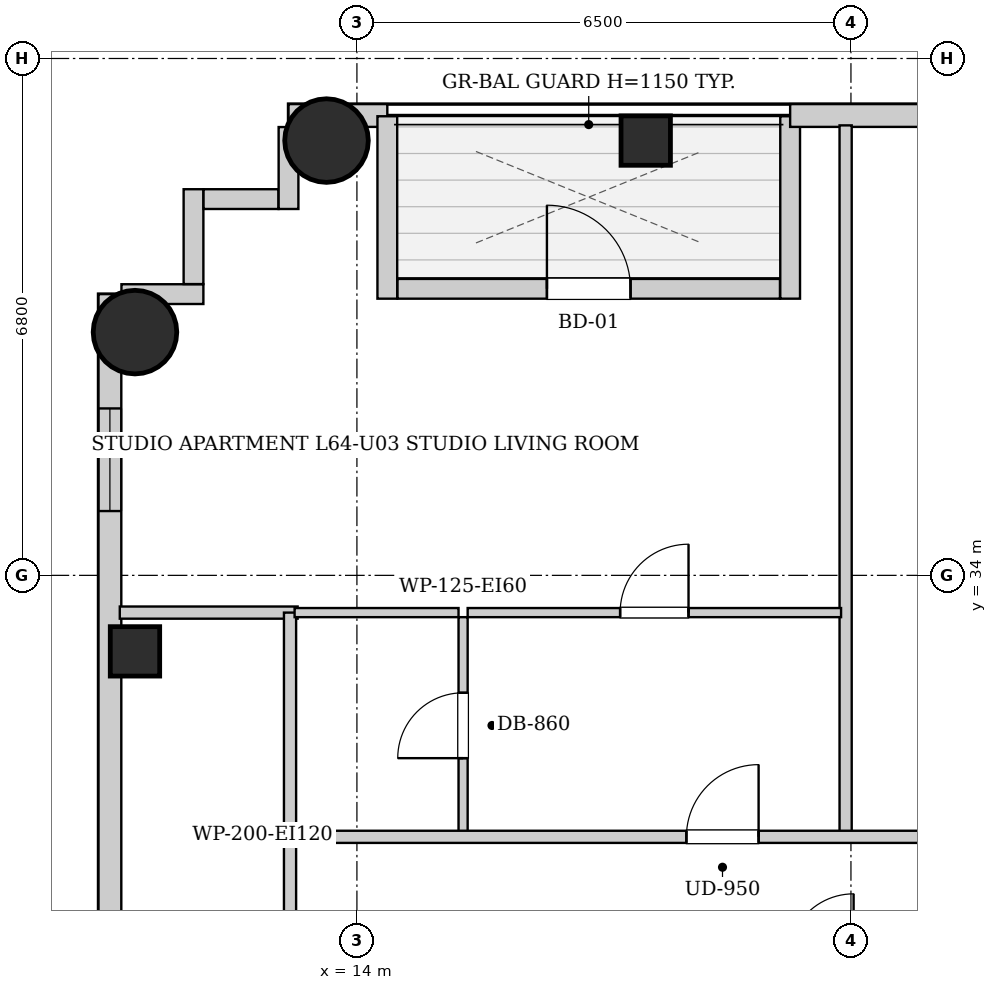
"""IFC4 building model, lengths in metres.
Left out: names, types, materials, properties, quantities, classifications, styles, units other than length and angle.
Written with IfcOpenShell. Run it as: python <this file> out.ifc"""

import sys

from ifc_helpers import new_model, si_unit, direction, frame, frame_2d, origin, origin_2d, place, context, subcontext, project, spatial, rectangle, circle, extrude, element, fill, save


model = new_model("IFC4")
c1 = context("Model", 3, precision=1e-05, world=origin(), true_north=direction((0.0, 1.0)))
c2 = subcontext(c1, "Body", "Model", "MODEL_VIEW")
j1 = project(units=[si_unit("LENGTHUNIT", "METRE"), si_unit("PLANEANGLEUNIT", "RADIAN")], contexts=[c1])
p1 = place(None, origin())
s1 = spatial("IfcSite", under=j1, at=p1, CompositionType="ELEMENT")
p2 = place(p1, origin())
s2 = spatial("IfcBuilding", under=s1, at=p2, CompositionType="ELEMENT")
p3 = place(p2, frame((0.0, 0.0, 220.7)))
s3 = spatial("IfcBuildingStorey", under=s2, at=p3, CompositionType="ELEMENT", Elevation=220.7)
p4 = place(p3, frame((13.6, 39.72, 0.0), z_axis=(0.0, 0.0, 1.0), x_axis=(1.0, 0.0, 0.0)))
e1 = element("IfcColumn", 1, at=p4, inside=s3, PredefinedType="COLUMN", context=c2, shape_type="SweptSolid", body=[
    extrude(circle(Radius=0.55, at=origin_2d()), origin(), (0.0, 0.0, 1.0), 3.4),
])
for number, where, z_axis, x_axis in (
    (2, (17.8, 39.72, 0.0), (0.0, 0.0, 1.0), (1.0, 0.0, 0.0)),
    (3, (11.08, 33.0, 0.0), (0.0, 0.0, 1.0), (1.0, 0.0, 0.0)),
):
    element("IfcColumn", number, at=place(p3, frame(where, z_axis=z_axis, x_axis=x_axis)), inside=s3, PredefinedType="COLUMN", context=c2, shape_type="SweptSolid", body=[
        extrude(rectangle(XDim=0.65, YDim=0.65, at=origin_2d()), origin(), (0.0, 0.0, 1.0), 3.4),
    ])
p5 = place(p3, frame((11.08, 37.2, 0.0), z_axis=(0.0, 0.0, 1.0), x_axis=(1.0, 0.0, 0.0)))
e4 = element("IfcColumn", 4, at=p5, inside=s3, PredefinedType="COLUMN", context=c2, shape_type="SweptSolid", body=[
    extrude(circle(Radius=0.55, at=origin_2d()), origin(), (0.0, 0.0, 1.0), 3.4),
])
p6 = place(p3, frame((13.1, 40.05, 0.0), z_axis=(0.0, 0.0, 1.0), x_axis=(1.0, 0.0, 0.0)))
e5 = element("IfcWall", 5, at=p6, inside=s3, PredefinedType="SOLIDWALL", context=c2, shape_type="SweptSolid", body=[
    extrude(rectangle(XDim=1.3, YDim=0.3, at=frame_2d((0.65, 0.0))), origin(), (0.0, 0.0, 1.0), 3.14),
])
p7 = place(p3, frame((14.4, 40.04, 0.0), z_axis=(0.0, 0.0, 1.0), x_axis=(0.0, -1.0, 0.0)))
e6 = element("IfcWall", 6, at=p7, inside=s3, PredefinedType="SOLIDWALL", context=c2, shape_type="SweptSolid", body=[
    extrude(rectangle(XDim=2.4, YDim=0.26, at=frame_2d((1.2, 0.0))), origin(), (0.0, 0.0, 1.0), 3.14),
])
p8 = place(p3, frame((14.534, 37.77, 0.0), z_axis=(0.0, 0.0, 1.0), x_axis=(1.0, 0.0, 0.0)))
e7 = element("IfcWall", 7, at=p8, inside=s3, PredefinedType="SOLIDWALL", context=c2, shape_type="SweptSolid", body=[
    extrude(rectangle(XDim=5.032, YDim=0.26, at=frame_2d((2.516, 0.0))), origin(), (0.0, 0.0, 1.0), 3.14),
])
p9 = place(p8, frame((1.966, 0.0, 0.0)))
e8 = element("IfcOpeningElement", 8, at=p9, cuts=e7, PredefinedType="OPENING", context=c2, shape_type="SweptSolid", body=[
    extrude(rectangle(XDim=1.1, YDim=2.0, at=frame_2d((0.55, 1.0))), frame((0.0, 0.14, 0.0), z_axis=(0.0, -1.0, 0.0), x_axis=(1.0, 0.0, 0.0)), (0.0, 0.0, 1.0), 0.28),
])
p10 = place(p3, frame((19.7, 37.64, 0.0), z_axis=(0.0, 0.0, 1.0), x_axis=(0.0, 1.0, 0.0)))
e9 = element("IfcWall", 9, at=p10, inside=s3, PredefinedType="SOLIDWALL", context=c2, shape_type="SweptSolid", body=[
    extrude(rectangle(XDim=2.4, YDim=0.26, at=frame_2d((1.2, 0.0))), origin(), (0.0, 0.0, 1.0), 3.14),
])
p11 = place(p3, frame((19.7, 40.05, 0.0), z_axis=(0.0, 0.0, 1.0), x_axis=(1.0, 0.0, 0.0)))
e10 = element("IfcWall", 10, at=p11, inside=s3, PredefinedType="SOLIDWALL", context=c2, shape_type="SweptSolid", body=[
    extrude(rectangle(XDim=9.15, YDim=0.3, at=frame_2d((4.575, 0.0))), origin(), (0.0, 0.0, 1.0), 3.14),
])
p12 = place(p11, frame((7.8, 0.0, 0.55)))
e11 = element("IfcOpeningElement", 11, at=p12, cuts=e10, PredefinedType="OPENING", context=c2, shape_type="SweptSolid", body=[
    extrude(rectangle(XDim=0.85, YDim=1.2, at=frame_2d((0.425, 0.6))), frame((0.0, 0.16, 0.0), z_axis=(0.0, -1.0, 0.0), x_axis=(1.0, 0.0, 0.0)), (0.0, 0.0, 1.0), 0.32),
])
p13 = place(p3, frame((10.75, 6.3, 0.0), z_axis=(0.0, 0.0, 1.0), x_axis=(0.0, 1.0, 0.0)))
e12 = element("IfcWall", 12, at=p13, inside=s3, PredefinedType="SOLIDWALL", context=c2, shape_type="SweptSolid", body=[
    extrude(rectangle(XDim=31.4, YDim=0.3, at=frame_2d((15.7, 0.0))), origin(), (0.0, 0.0, 1.0), 3.14),
])
p14 = place(p13, frame((1.504, 0.0, 0.55)))
e13 = element("IfcOpeningElement", 13, at=p14, cuts=e12, PredefinedType="OPENING", context=c2, shape_type="SweptSolid", body=[
    extrude(rectangle(XDim=1.35, YDim=1.2, at=frame_2d((0.675, 0.6))), frame((0.0, 0.16, 0.0), z_axis=(0.0, -1.0, 0.0), x_axis=(1.0, 0.0, 0.0)), (0.0, 0.0, 1.0), 0.32),
])
p15 = place(p13, frame((28.546, 0.0, 0.55)))
e14 = element("IfcOpeningElement", 14, at=p15, cuts=e12, PredefinedType="OPENING", context=c2, shape_type="SweptSolid", body=[
    extrude(rectangle(XDim=1.35, YDim=1.2, at=frame_2d((0.675, 0.6))), frame((0.0, 0.16, 0.0), z_axis=(0.0, -1.0, 0.0), x_axis=(1.0, 0.0, 0.0)), (0.0, 0.0, 1.0), 0.32),
])
p16 = place(p13, frame((10.367, 0.0, 0.55)))
e15 = element("IfcOpeningElement", 15, at=p16, cuts=e12, PredefinedType="OPENING", context=c2, shape_type="SweptSolid", body=[
    extrude(rectangle(XDim=1.35, YDim=1.2, at=frame_2d((0.675, 0.6))), frame((0.0, 0.16, 0.0), z_axis=(0.0, -1.0, 0.0), x_axis=(1.0, 0.0, 0.0)), (0.0, 0.0, 1.0), 0.32),
])
p17 = place(p13, frame((19.683, 0.0, 0.55)))
e16 = element("IfcOpeningElement", 16, at=p17, cuts=e12, PredefinedType="OPENING", context=c2, shape_type="SweptSolid", body=[
    extrude(rectangle(XDim=1.35, YDim=1.2, at=frame_2d((0.675, 0.6))), frame((0.0, 0.16, 0.0), z_axis=(0.0, -1.0, 0.0), x_axis=(1.0, 0.0, 0.0)), (0.0, 0.0, 1.0), 0.32),
])
p18 = place(p3, frame((10.902, 37.7, 0.0), z_axis=(0.0, 0.0, 1.0), x_axis=(1.0, 0.0, 0.0)))
e17 = element("IfcWall", 17, at=p18, inside=s3, PredefinedType="SOLIDWALL", context=c2, shape_type="SweptSolid", body=[
    extrude(rectangle(XDim=1.078, YDim=0.26, at=frame_2d((0.539, 0.0))), origin(), (0.0, 0.0, 1.0), 3.14),
])
p19 = place(p3, frame((11.85, 37.832, 0.0), z_axis=(0.0, 0.0, 1.0), x_axis=(0.0, 1.0, 0.0)))
e18 = element("IfcWall", 18, at=p19, inside=s3, PredefinedType="SOLIDWALL", context=c2, shape_type="SweptSolid", body=[
    extrude(rectangle(XDim=1.248, YDim=0.26, at=frame_2d((0.624, 0.0))), origin(), (0.0, 0.0, 1.0), 3.14),
])
p20 = place(p3, frame((11.982, 38.95, 0.0), z_axis=(0.0, 0.0, 1.0), x_axis=(1.0, 0.0, 0.0)))
e19 = element("IfcWall", 19, at=p20, inside=s3, PredefinedType="SOLIDWALL", context=c2, shape_type="SweptSolid", body=[
    extrude(rectangle(XDim=0.986, YDim=0.26, at=frame_2d((0.493, 0.0))), origin(), (0.0, 0.0, 1.0), 3.14),
])
p21 = place(p3, frame((13.1, 38.82, 0.0), z_axis=(0.0, 0.0, 1.0), x_axis=(0.0, 1.0, 0.0)))
e20 = element("IfcWall", 20, at=p21, inside=s3, PredefinedType="SOLIDWALL", context=c2, shape_type="SweptSolid", body=[
    extrude(rectangle(XDim=1.078, YDim=0.26, at=frame_2d((0.539, 0.0))), origin(), (0.0, 0.0, 1.0), 3.14),
])
p22 = place(p3, frame((13.12, 28.98, 0.0), z_axis=(0.0, 0.0, 1.0), x_axis=(0.0, 1.0, 0.0)))
e21 = element("IfcWall", 21, at=p22, inside=s3, PredefinedType="PARTITIONING", context=c2, shape_type="SweptSolid", body=[
    extrude(rectangle(XDim=1.58, YDim=0.16, at=frame_2d((0.79, 0.0))), origin(), (0.0, 0.0, 1.0), 3.14),
])
p23 = place(p3, frame((10.88, 33.51, 0.0), z_axis=(0.0, 0.0, 1.0), x_axis=(1.0, 0.0, 0.0)))
e22 = element("IfcWall", 22, at=p23, inside=s3, PredefinedType="PARTITIONING", context=c2, shape_type="SweptSolid", body=[
    extrude(rectangle(XDim=2.34, YDim=0.16, at=frame_2d((1.17, 0.0))), origin(), (0.0, 0.0, 1.0), 3.14),
])
p24 = place(p3, frame((13.12, 30.6, 0.0), z_axis=(0.0, 0.0, 1.0), x_axis=(0.0, 1.0, 0.0)))
e23 = element("IfcWall", 23, at=p24, inside=s3, PredefinedType="PARTITIONING", context=c2, shape_type="SweptSolid", body=[
    extrude(rectangle(XDim=2.91, YDim=0.16, at=frame_2d((1.455, 0.0))), origin(), (0.0, 0.0, 1.0), 3.14),
])
p25 = place(p3, frame((20.43, 30.6, 0.0), z_axis=(0.0, 0.0, 1.0), x_axis=(0.0, 1.0, 0.0)))
e24 = element("IfcWall", 24, at=p25, inside=s3, PredefinedType="PARTITIONING", context=c2, shape_type="SweptSolid", body=[
    extrude(rectangle(XDim=9.32, YDim=0.16, at=frame_2d((4.66, 0.0))), origin(), (0.0, 0.0, 1.0), 3.14),
])
p26 = place(p3, frame((15.397, 30.6, 0.0), z_axis=(0.0, 0.0, 1.0), x_axis=(0.0, 1.0, 0.0)))
e25 = element("IfcWall", 25, at=p26, inside=s3, PredefinedType="PARTITIONING", context=c2, shape_type="SweptSolid", body=[
    extrude(rectangle(XDim=2.85, YDim=0.12, at=frame_2d((1.425, 0.0))), origin(), (0.0, 0.0, 1.0), 3.14),
])
p27 = place(p26, frame((0.995, 0.0, 0.0)))
e26 = element("IfcOpeningElement", 26, at=p27, cuts=e25, PredefinedType="OPENING", context=c2, shape_type="SweptSolid", body=[
    extrude(rectangle(XDim=0.86, YDim=2.05, at=frame_2d((0.43, 1.025))), frame((0.0, 0.07, 0.0), z_axis=(0.0, -1.0, 0.0), x_axis=(1.0, 0.0, 0.0)), (0.0, 0.0, 1.0), 0.14),
])
p28 = place(p3, frame((13.18, 33.51, 0.0), z_axis=(0.0, 0.0, 1.0), x_axis=(1.0, 0.0, 0.0)))
e27 = element("IfcWall", 27, at=p28, inside=s3, PredefinedType="PARTITIONING", context=c2, shape_type="SweptSolid", body=[
    extrude(rectangle(XDim=2.157, YDim=0.12, at=frame_2d((1.079, 0.0))), origin(), (0.0, 0.0, 1.0), 3.14),
])
p29 = place(p3, frame((15.457, 33.51, 0.0), z_axis=(0.0, 0.0, 1.0), x_axis=(1.0, 0.0, 0.0)))
e28 = element("IfcWall", 28, at=p29, inside=s3, PredefinedType="PARTITIONING", context=c2, shape_type="SweptSolid", body=[
    extrude(rectangle(XDim=4.913, YDim=0.12, at=frame_2d((2.457, 0.0))), origin(), (0.0, 0.0, 1.0), 3.14),
])
p30 = place(p29, frame((2.006, 0.0, 0.0)))
e29 = element("IfcOpeningElement", 29, at=p30, cuts=e28, PredefinedType="OPENING", context=c2, shape_type="SweptSolid", body=[
    extrude(rectangle(XDim=0.9, YDim=2.05, at=frame_2d((0.45, 1.025))), frame((0.0, 0.07, 0.0), z_axis=(0.0, -1.0, 0.0), x_axis=(1.0, 0.0, 0.0)), (0.0, 0.0, 1.0), 0.14),
])
p31 = place(p3, frame((13.15, 30.56, 0.0), z_axis=(0.0, 0.0, 1.0), x_axis=(1.0, 0.0, 0.0)))
e30 = element("IfcWall", 30, at=p31, inside=s3, PredefinedType="PARTITIONING", context=c2, shape_type="SweptSolid", body=[
    extrude(rectangle(XDim=24.6, YDim=0.16, at=frame_2d((12.3, 0.0))), origin(), (0.0, 0.0, 1.0), 3.14),
])
p32 = place(p31, frame((5.185, 0.0, 0.0)))
e31 = element("IfcOpeningElement", 31, at=p32, cuts=e30, PredefinedType="OPENING", context=c2, shape_type="SweptSolid", body=[
    extrude(rectangle(XDim=0.95, YDim=2.1, at=frame_2d((0.475, 1.05))), frame((0.0, 0.09, 0.0), z_axis=(0.0, -1.0, 0.0), x_axis=(1.0, 0.0, 0.0)), (0.0, 0.0, 1.0), 0.18),
])
p33 = place(p31, frame((14.16, 0.0, 0.0)))
e32 = element("IfcOpeningElement", 32, at=p33, cuts=e30, PredefinedType="OPENING", context=c2, shape_type="SweptSolid", body=[
    extrude(rectangle(XDim=0.95, YDim=2.1, at=frame_2d((0.475, 1.05))), frame((0.0, 0.09, 0.0), z_axis=(0.0, -1.0, 0.0), x_axis=(1.0, 0.0, 0.0)), (0.0, 0.0, 1.0), 0.18),
])
p34 = place(p31, frame((22.825, 0.0, 0.0)))
e33 = element("IfcOpeningElement", 33, at=p34, cuts=e30, PredefinedType="OPENING", context=c2, shape_type="SweptSolid", body=[
    extrude(rectangle(XDim=0.95, YDim=2.1, at=frame_2d((0.475, 1.05))), frame((0.0, 0.09, 0.0), z_axis=(0.0, -1.0, 0.0), x_axis=(1.0, 0.0, 0.0)), (0.0, 0.0, 1.0), 0.18),
])
p35 = place(p27, origin())
e34 = element("IfcDoor", 34, at=p35, inside=s3, OperationType="SINGLE_SWING_LEFT", PredefinedType="DOOR", context=c2, shape_type="SweptSolid", body=[
    extrude(rectangle(XDim=0.86, YDim=2.05, at=frame_2d((0.43, 1.025))), frame((0.0, 0.025, 0.0), z_axis=(0.0, -1.0, 0.0), x_axis=(1.0, 0.0, 0.0)), (0.0, 0.0, 1.0), 0.05),
])
fill(e26, e34)
p36 = place(p30, origin())
e35 = element("IfcDoor", 35, at=p36, inside=s3, OperationType="SINGLE_SWING_RIGHT", PredefinedType="DOOR", context=c2, shape_type="SweptSolid", body=[
    extrude(rectangle(XDim=0.9, YDim=2.05, at=frame_2d((0.45, 1.025))), frame((0.0, 0.025, 0.0), z_axis=(0.0, -1.0, 0.0), x_axis=(1.0, 0.0, 0.0)), (0.0, 0.0, 1.0), 0.05),
])
fill(e29, e35)
p37 = place(p32, origin())
e36 = element("IfcDoor", 36, at=p37, inside=s3, OperationType="SINGLE_SWING_RIGHT", PredefinedType="DOOR", context=c2, shape_type="SweptSolid", body=[
    extrude(rectangle(XDim=0.95, YDim=2.1, at=frame_2d((0.475, 1.05))), frame((0.0, 0.025, 0.0), z_axis=(0.0, -1.0, 0.0), x_axis=(1.0, 0.0, 0.0)), (0.0, 0.0, 1.0), 0.05),
])
fill(e31, e36)
p38 = place(p9, origin())
e37 = element("IfcDoor", 37, at=p38, inside=s3, OperationType="SINGLE_SWING_LEFT", PredefinedType="DOOR", context=c2, shape_type="SweptSolid", body=[
    extrude(rectangle(XDim=1.1, YDim=2.0, at=frame_2d((0.55, 1.0))), frame((0.0, 0.025, 0.0), z_axis=(0.0, -1.0, 0.0), x_axis=(1.0, 0.0, 0.0)), (0.0, 0.0, 1.0), 0.05),
])
fill(e8, e37)
p39 = place(p15, origin())
e38 = element("IfcWindow", 38, at=p39, inside=s3, PartitioningType="SINGLE_PANEL", PredefinedType="WINDOW", context=c2, shape_type="SweptSolid", body=[
    extrude(rectangle(XDim=1.35, YDim=1.2, at=frame_2d((0.675, 0.6))), frame((0.0, 0.03, 0.0), z_axis=(0.0, -1.0, 0.0), x_axis=(1.0, 0.0, 0.0)), (0.0, 0.0, 1.0), 0.06),
])
fill(e14, e38)
save(model, sys.argv[1])
